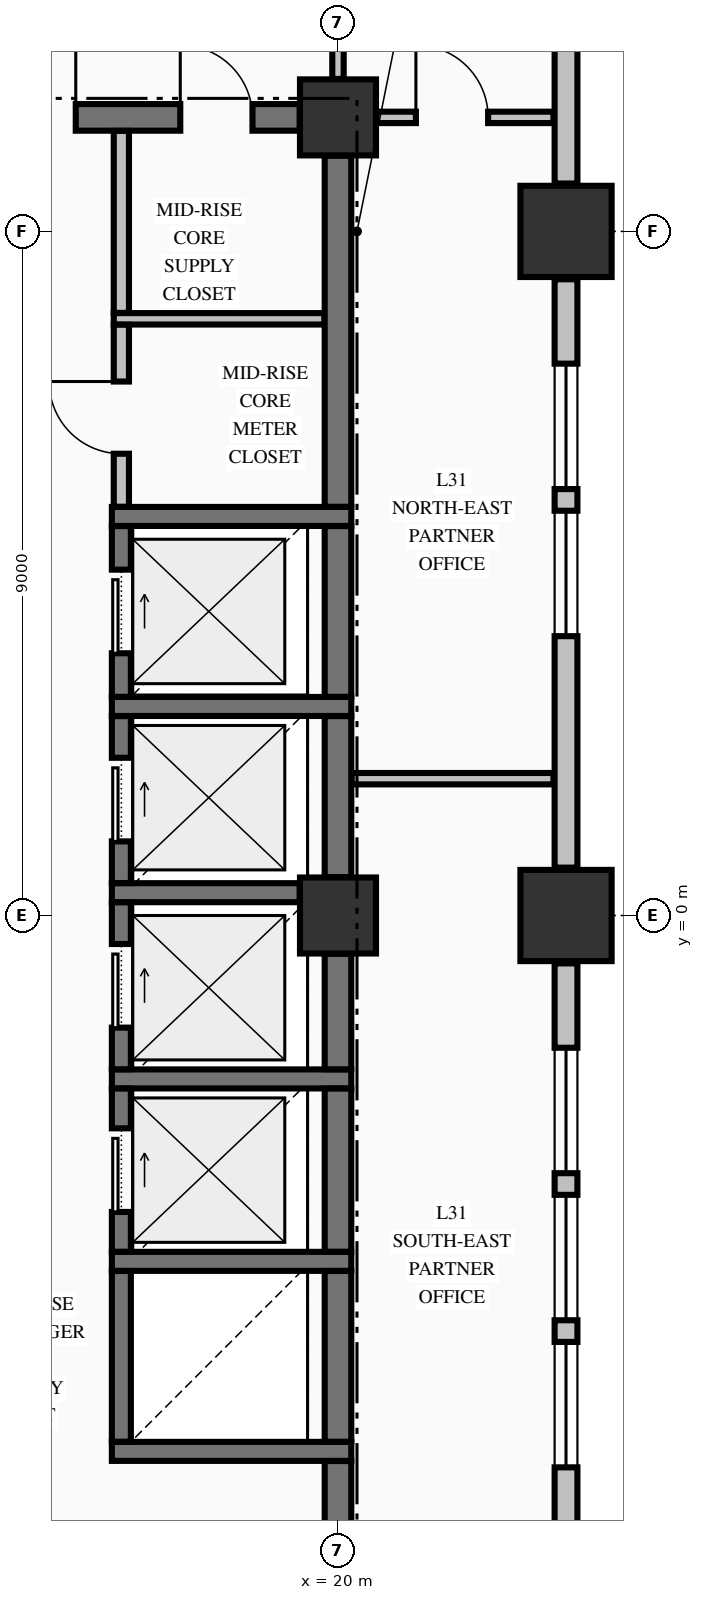
"""IFC4 building model, lengths in metres.
Left out: names, types, materials, properties, quantities, classifications, styles, units other than length and angle.
Written with IfcOpenShell. Run it as: python <this file> out.ifc"""

import sys

from ifc_helpers import new_model, si_unit, direction, frame, frame_2d, origin, origin_2d, place, context, subcontext, project, spatial, rectangle, extrude, element, fill, save


model = new_model("IFC4")
c1 = context("Model", 3, precision=1e-05, world=origin(), true_north=direction((0.0, 1.0)))
c2 = subcontext(c1, "Body", "Model", "MODEL_VIEW")
j1 = project(units=[si_unit("LENGTHUNIT", "METRE"), si_unit("PLANEANGLEUNIT", "RADIAN")], contexts=[c1])
p1 = place(None, origin())
s1 = spatial("IfcSite", under=j1, at=p1, CompositionType="ELEMENT")
p2 = place(p1, origin())
s2 = spatial("IfcBuilding", under=s1, at=p2, CompositionType="ELEMENT")
p3 = place(p2, frame((0.0, 0.0, 124.92)))
s3 = spatial("IfcBuildingStorey", under=s2, at=p3, CompositionType="ELEMENT", Elevation=124.92)
for number, where, z_axis, x_axis in (
    (1, (23.0, 0.0, -0.25), (0.0, 0.0, 1.0), (1.0, 0.0, 0.0)),
    (2, (23.0, 9.0, -0.25), (0.0, 0.0, 1.0), (1.0, 0.0, 0.0)),
):
    element("IfcColumn", number, at=place(p3, frame(where, z_axis=z_axis, x_axis=x_axis)), inside=s3, PredefinedType="COLUMN", context=c2, shape_type="SweptSolid", body=[
        extrude(rectangle(XDim=1.2, YDim=1.2, at=origin_2d()), origin(), (0.0, 0.0, 1.0), 3.57),
    ])
for number, where, z_axis, x_axis in (
    (3, (20.0, 10.5, -0.25), (0.0, 0.0, 1.0), (1.0, 0.0, 0.0)),
    (4, (20.0, 0.0, -0.25), (0.0, 0.0, 1.0), (1.0, 0.0, 0.0)),
):
    element("IfcColumn", number, at=place(p3, frame(where, z_axis=z_axis, x_axis=x_axis)), inside=s3, PredefinedType="COLUMN", context=c2, shape_type="SweptSolid", body=[
        extrude(rectangle(XDim=1.0, YDim=1.0, at=origin_2d()), origin(), (0.0, 0.0, 1.0), 3.57),
    ])
p4 = place(p3, frame((23.0, -8.37, 0.0), z_axis=(0.0, 0.0, 1.0), x_axis=(0.0, 1.0, 0.0)))
e5 = element("IfcWall", 5, at=p4, inside=s3, PredefinedType="STANDARD", context=c2, shape_type="SweptSolid", body=[
    extrude(rectangle(XDim=7.74, YDim=0.3, at=frame_2d((3.87, 0.0))), origin(), (0.0, 0.0, 1.0), 2.712),
])
p5 = place(p4, frame((1.11, 0.0, 0.8)))
e6 = element("IfcOpeningElement", 6, at=p5, cuts=e5, PredefinedType="OPENING", context=c2, shape_type="SweptSolid", body=[
    extrude(rectangle(XDim=1.65, YDim=1.7, at=frame_2d((0.825, 0.85))), frame((0.0, 0.16, 0.0), z_axis=(0.0, -1.0, 0.0), x_axis=(1.0, 0.0, 0.0)), (0.0, 0.0, 1.0), 0.32),
])
p6 = place(p4, frame((3.045, 0.0, 0.8)))
e7 = element("IfcOpeningElement", 7, at=p6, cuts=e5, PredefinedType="OPENING", context=c2, shape_type="SweptSolid", body=[
    extrude(rectangle(XDim=1.65, YDim=1.7, at=frame_2d((0.825, 0.85))), frame((0.0, 0.16, 0.0), z_axis=(0.0, -1.0, 0.0), x_axis=(1.0, 0.0, 0.0)), (0.0, 0.0, 1.0), 0.32),
])
p7 = place(p4, frame((4.98, 0.0, 0.8)))
e8 = element("IfcOpeningElement", 8, at=p7, cuts=e5, PredefinedType="OPENING", context=c2, shape_type="SweptSolid", body=[
    extrude(rectangle(XDim=1.65, YDim=1.7, at=frame_2d((0.825, 0.85))), frame((0.0, 0.16, 0.0), z_axis=(0.0, -1.0, 0.0), x_axis=(1.0, 0.0, 0.0)), (0.0, 0.0, 1.0), 0.32),
])
p8 = place(p3, frame((23.0, 0.63, 0.0), z_axis=(0.0, 0.0, 1.0), x_axis=(0.0, 1.0, 0.0)))
e9 = element("IfcWall", 9, at=p8, inside=s3, PredefinedType="STANDARD", context=c2, shape_type="SweptSolid", body=[
    extrude(rectangle(XDim=7.74, YDim=0.3, at=frame_2d((3.87, 0.0))), origin(), (0.0, 0.0, 1.0), 2.712),
])
p9 = place(p8, frame((3.045, 0.0, 0.8)))
e10 = element("IfcOpeningElement", 10, at=p9, cuts=e9, PredefinedType="OPENING", context=c2, shape_type="SweptSolid", body=[
    extrude(rectangle(XDim=1.65, YDim=1.7, at=frame_2d((0.825, 0.85))), frame((0.0, 0.16, 0.0), z_axis=(0.0, -1.0, 0.0), x_axis=(1.0, 0.0, 0.0)), (0.0, 0.0, 1.0), 0.32),
])
p10 = place(p8, frame((4.98, 0.0, 0.8)))
e11 = element("IfcOpeningElement", 11, at=p10, cuts=e9, PredefinedType="OPENING", context=c2, shape_type="SweptSolid", body=[
    extrude(rectangle(XDim=1.65, YDim=1.7, at=frame_2d((0.825, 0.85))), frame((0.0, 0.16, 0.0), z_axis=(0.0, -1.0, 0.0), x_axis=(1.0, 0.0, 0.0)), (0.0, 0.0, 1.0), 0.32),
])
p11 = place(p3, frame((23.0, 9.63, 0.0), z_axis=(0.0, 0.0, 1.0), x_axis=(0.0, 1.0, 0.0)))
e12 = element("IfcWall", 12, at=p11, inside=s3, PredefinedType="STANDARD", context=c2, shape_type="SweptSolid", body=[
    extrude(rectangle(XDim=10.74, YDim=0.3, at=frame_2d((5.37, 0.0))), origin(), (0.0, 0.0, 1.0), 2.712),
])
for number, where, z_axis, x_axis in (
    (13, (17.025, -7.05, 0.0), (0.0, 0.0, 1.0), (1.0, 0.0, 0.0)),
    (14, (17.025, -4.55, 0.0), (0.0, 0.0, 1.0), (1.0, 0.0, 0.0)),
    (15, (17.025, -2.15, 0.0), (0.0, 0.0, 1.0), (1.0, 0.0, 0.0)),
):
    element("IfcWall", number, at=place(p3, frame(where, z_axis=z_axis, x_axis=x_axis)), inside=s3, PredefinedType="SOLIDWALL", context=c2, shape_type="SweptSolid", body=[
        extrude(rectangle(XDim=3.15, YDim=0.25, at=frame_2d((1.575, 0.0))), origin(), (0.0, 0.0, 1.0), 3.32),
    ])
p12 = place(p3, frame((17.025, 0.3, 0.0), z_axis=(0.0, 0.0, 1.0), x_axis=(1.0, 0.0, 0.0)))
e16 = element("IfcWall", 16, at=p12, inside=s3, PredefinedType="SOLIDWALL", context=c2, shape_type="SweptSolid", body=[
    extrude(rectangle(XDim=2.471, YDim=0.25, at=frame_2d((1.236, 0.0))), origin(), (0.0, 0.0, 1.0), 3.32),
])
for number, where, z_axis, x_axis in (
    (17, (17.025, 2.75, 0.0), (0.0, 0.0, 1.0), (1.0, 0.0, 0.0)),
    (18, (17.025, 5.25, 0.0), (0.0, 0.0, 1.0), (1.0, 0.0, 0.0)),
):
    element("IfcWall", number, at=place(p3, frame(where, z_axis=z_axis, x_axis=x_axis)), inside=s3, PredefinedType="SOLIDWALL", context=c2, shape_type="SweptSolid", body=[
        extrude(rectangle(XDim=3.15, YDim=0.25, at=frame_2d((1.575, 0.0))), origin(), (0.0, 0.0, 1.0), 3.32),
    ])
p13 = place(p3, frame((14.7, 10.5, 0.0), z_axis=(0.0, 0.0, 1.0), x_axis=(1.0, 0.0, 0.0)))
e19 = element("IfcWall", 19, at=p13, inside=s3, PredefinedType="SHEAR", context=c2, shape_type="SweptSolid", body=[
    extrude(rectangle(XDim=4.796, YDim=0.35, at=frame_2d((2.398, 0.0))), origin(), (0.0, 0.0, 1.0), 3.32),
])
p14 = place(p13, frame((0.65, 0.0, 0.0)))
e20 = element("IfcOpeningElement", 20, at=p14, cuts=e19, PredefinedType="OPENING", context=c2, shape_type="SweptSolid", body=[
    extrude(rectangle(XDim=1.2, YDim=2.15, at=frame_2d((0.6, 1.075))), frame((0.0, 0.185, 0.0), z_axis=(0.0, -1.0, 0.0), x_axis=(1.0, 0.0, 0.0)), (0.0, 0.0, 1.0), 0.37),
])
p15 = place(p13, frame((3.225, 0.0, 0.0)))
e21 = element("IfcOpeningElement", 21, at=p15, cuts=e19, PredefinedType="OPENING", context=c2, shape_type="SweptSolid", body=[
    extrude(rectangle(XDim=0.95, YDim=2.15, at=frame_2d((0.475, 1.075))), frame((0.0, 0.185, 0.0), z_axis=(0.0, -1.0, 0.0), x_axis=(1.0, 0.0, 0.0)), (0.0, 0.0, 1.0), 0.37),
])
p16 = place(p3, frame((20.178, 1.8, 0.0), z_axis=(0.0, 0.0, 1.0), x_axis=(1.0, 0.0, 0.0)))
e22 = element("IfcWall", 22, at=p16, inside=s3, PredefinedType="PARTITIONING", context=c2, shape_type="SweptSolid", body=[
    extrude(rectangle(XDim=2.657, YDim=0.15, at=frame_2d((1.329, 0.0))), origin(), (0.0, 0.0, 1.0), 3.32),
])
p17 = place(p3, frame((17.05, 7.85, 0.0), z_axis=(0.0, 0.0, 1.0), x_axis=(1.0, 0.0, 0.0)))
e23 = element("IfcWall", 23, at=p17, inside=s3, PredefinedType="PARTITIONING", context=c2, shape_type="SweptSolid", body=[
    extrude(rectangle(XDim=2.772, YDim=0.15, at=frame_2d((1.386, 0.0))), origin(), (0.0, 0.0, 1.0), 3.32),
])
p18 = place(p3, frame((20.506, 10.5, 0.0), z_axis=(0.0, 0.0, 1.0), x_axis=(1.0, 0.0, 0.0)))
e24 = element("IfcWall", 24, at=p18, inside=s3, PredefinedType="PARTITIONING", context=c2, shape_type="SweptSolid", body=[
    extrude(rectangle(XDim=2.329, YDim=0.15, at=frame_2d((1.165, 0.0))), origin(), (0.0, 0.0, 1.0), 3.32),
])
p19 = place(p18, frame((0.519, 0.0, 0.0)))
e25 = element("IfcOpeningElement", 25, at=p19, cuts=e24, PredefinedType="OPENING", context=c2, shape_type="SweptSolid", body=[
    extrude(rectangle(XDim=0.95, YDim=2.15, at=frame_2d((0.475, 1.075))), frame((0.0, 0.085, 0.0), z_axis=(0.0, -1.0, 0.0), x_axis=(1.0, 0.0, 0.0)), (0.0, 0.0, 1.0), 0.17),
])
p20 = place(p3, frame((17.15, -6.923, 0.0), z_axis=(0.0, 0.0, 1.0), x_axis=(0.0, 1.0, 0.0)))
e26 = element("IfcWall", 26, at=p20, inside=s3, PredefinedType="SOLIDWALL", context=c2, shape_type="SweptSolid", body=[
    extrude(rectangle(XDim=2.246, YDim=0.25, at=frame_2d((1.123, 0.0))), origin(), (0.0, 0.0, 1.0), 3.32),
])
p21 = place(p3, frame((17.15, -4.423, 0.0), z_axis=(0.0, 0.0, 1.0), x_axis=(0.0, 1.0, 0.0)))
e27 = element("IfcWall", 27, at=p21, inside=s3, PredefinedType="SOLIDWALL", context=c2, shape_type="SweptSolid", body=[
    extrude(rectangle(XDim=2.146, YDim=0.25, at=frame_2d((1.073, 0.0))), origin(), (0.0, 0.0, 1.0), 3.32),
])
p22 = place(p21, frame((0.523, 0.0, 0.0)))
e28 = element("IfcOpeningElement", 28, at=p22, cuts=e27, PredefinedType="OPENING", context=c2, shape_type="SweptSolid", body=[
    extrude(rectangle(XDim=1.1, YDim=2.2, at=frame_2d((0.55, 1.1))), frame((0.0, 0.135, 0.0), z_axis=(0.0, -1.0, 0.0), x_axis=(1.0, 0.0, 0.0)), (0.0, 0.0, 1.0), 0.27),
])
p23 = place(p3, frame((17.15, -2.023, 0.0), z_axis=(0.0, 0.0, 1.0), x_axis=(0.0, 1.0, 0.0)))
e29 = element("IfcWall", 29, at=p23, inside=s3, PredefinedType="SOLIDWALL", context=c2, shape_type="SweptSolid", body=[
    extrude(rectangle(XDim=2.196, YDim=0.25, at=frame_2d((1.098, 0.0))), origin(), (0.0, 0.0, 1.0), 3.32),
])
p24 = place(p23, frame((0.548, 0.0, 0.0)))
e30 = element("IfcOpeningElement", 30, at=p24, cuts=e29, PredefinedType="OPENING", context=c2, shape_type="SweptSolid", body=[
    extrude(rectangle(XDim=1.1, YDim=2.2, at=frame_2d((0.55, 1.1))), frame((0.0, 0.135, 0.0), z_axis=(0.0, -1.0, 0.0), x_axis=(1.0, 0.0, 0.0)), (0.0, 0.0, 1.0), 0.27),
])
p25 = place(p3, frame((17.15, 0.427, 0.0), z_axis=(0.0, 0.0, 1.0), x_axis=(0.0, 1.0, 0.0)))
e31 = element("IfcWall", 31, at=p25, inside=s3, PredefinedType="SOLIDWALL", context=c2, shape_type="SweptSolid", body=[
    extrude(rectangle(XDim=2.196, YDim=0.25, at=frame_2d((1.098, 0.0))), origin(), (0.0, 0.0, 1.0), 3.32),
])
p26 = place(p25, frame((0.548, 0.0, 0.0)))
e32 = element("IfcOpeningElement", 32, at=p26, cuts=e31, PredefinedType="OPENING", context=c2, shape_type="SweptSolid", body=[
    extrude(rectangle(XDim=1.1, YDim=2.2, at=frame_2d((0.55, 1.1))), frame((0.0, 0.135, 0.0), z_axis=(0.0, -1.0, 0.0), x_axis=(1.0, 0.0, 0.0)), (0.0, 0.0, 1.0), 0.27),
])
p27 = place(p3, frame((17.15, 2.877, 0.0), z_axis=(0.0, 0.0, 1.0), x_axis=(0.0, 1.0, 0.0)))
e33 = element("IfcWall", 33, at=p27, inside=s3, PredefinedType="SOLIDWALL", context=c2, shape_type="SweptSolid", body=[
    extrude(rectangle(XDim=2.246, YDim=0.25, at=frame_2d((1.123, 0.0))), origin(), (0.0, 0.0, 1.0), 3.32),
])
p28 = place(p27, frame((0.573, 0.0, 0.0)))
e34 = element("IfcOpeningElement", 34, at=p28, cuts=e33, PredefinedType="OPENING", context=c2, shape_type="SweptSolid", body=[
    extrude(rectangle(XDim=1.1, YDim=2.2, at=frame_2d((0.55, 1.1))), frame((0.0, 0.135, 0.0), z_axis=(0.0, -1.0, 0.0), x_axis=(1.0, 0.0, 0.0)), (0.0, 0.0, 1.0), 0.27),
])
p29 = place(p3, frame((20.0, -9.446, 0.0), z_axis=(0.0, 0.0, 1.0), x_axis=(0.0, 1.0, 0.0)))
e35 = element("IfcWall", 35, at=p29, inside=s3, PredefinedType="SHEAR", context=c2, shape_type="SweptSolid", body=[
    extrude(rectangle(XDim=2.269, YDim=0.35, at=frame_2d((1.135, 0.0))), origin(), (0.0, 0.0, 1.0), 3.32),
])
p30 = place(p3, frame((20.0, -6.923, 0.0), z_axis=(0.0, 0.0, 1.0), x_axis=(0.0, 1.0, 0.0)))
e36 = element("IfcWall", 36, at=p30, inside=s3, PredefinedType="SHEAR", context=c2, shape_type="SweptSolid", body=[
    extrude(rectangle(XDim=2.246, YDim=0.35, at=frame_2d((1.123, 0.0))), origin(), (0.0, 0.0, 1.0), 3.32),
])
p31 = place(p3, frame((20.0, -4.423, 0.0), z_axis=(0.0, 0.0, 1.0), x_axis=(0.0, 1.0, 0.0)))
e37 = element("IfcWall", 37, at=p31, inside=s3, PredefinedType="SHEAR", context=c2, shape_type="SweptSolid", body=[
    extrude(rectangle(XDim=2.146, YDim=0.35, at=frame_2d((1.073, 0.0))), origin(), (0.0, 0.0, 1.0), 3.32),
])
p32 = place(p3, frame((20.0, -2.023, 0.0), z_axis=(0.0, 0.0, 1.0), x_axis=(0.0, 1.0, 0.0)))
e38 = element("IfcWall", 38, at=p32, inside=s3, PredefinedType="SHEAR", context=c2, shape_type="SweptSolid", body=[
    extrude(rectangle(XDim=1.519, YDim=0.35, at=frame_2d((0.76, 0.0))), origin(), (0.0, 0.0, 1.0), 3.32),
])
p33 = place(p3, frame((20.0, 0.504, 0.0), z_axis=(0.0, 0.0, 1.0), x_axis=(0.0, 1.0, 0.0)))
e39 = element("IfcWall", 39, at=p33, inside=s3, PredefinedType="SHEAR", context=c2, shape_type="SweptSolid", body=[
    extrude(rectangle(XDim=2.119, YDim=0.35, at=frame_2d((1.06, 0.0))), origin(), (0.0, 0.0, 1.0), 3.32),
])
p34 = place(p3, frame((20.0, 2.877, 0.0), z_axis=(0.0, 0.0, 1.0), x_axis=(0.0, 1.0, 0.0)))
e40 = element("IfcWall", 40, at=p34, inside=s3, PredefinedType="SHEAR", context=c2, shape_type="SweptSolid", body=[
    extrude(rectangle(XDim=2.246, YDim=0.35, at=frame_2d((1.123, 0.0))), origin(), (0.0, 0.0, 1.0), 3.32),
])
p35 = place(p3, frame((20.0, 5.377, 0.0), z_axis=(0.0, 0.0, 1.0), x_axis=(0.0, 1.0, 0.0)))
e41 = element("IfcWall", 41, at=p35, inside=s3, PredefinedType="SHEAR", context=c2, shape_type="SweptSolid", body=[
    extrude(rectangle(XDim=4.619, YDim=0.35, at=frame_2d((2.31, 0.0))), origin(), (0.0, 0.0, 1.0), 3.32),
])
p36 = place(p3, frame((17.15, 5.378, 0.0), z_axis=(0.0, 0.0, 1.0), x_axis=(0.0, 1.0, 0.0)))
e42 = element("IfcWall", 42, at=p36, inside=s3, PredefinedType="PARTITIONING", context=c2, shape_type="SweptSolid", body=[
    extrude(rectangle(XDim=2.394, YDim=0.2, at=frame_2d((1.197, 0.0))), origin(), (0.0, 0.0, 1.0), 3.32),
])
p37 = place(p36, frame((0.697, 0.0, 0.0)))
e43 = element("IfcOpeningElement", 43, at=p37, cuts=e42, PredefinedType="OPENING", context=c2, shape_type="SweptSolid", body=[
    extrude(rectangle(XDim=0.95, YDim=2.15, at=frame_2d((0.475, 1.075))), frame((0.0, 0.11, 0.0), z_axis=(0.0, -1.0, 0.0), x_axis=(1.0, 0.0, 0.0)), (0.0, 0.0, 1.0), 0.22),
])
p38 = place(p3, frame((17.15, 7.928, 0.0), z_axis=(0.0, 0.0, 1.0), x_axis=(0.0, 1.0, 0.0)))
e44 = element("IfcWall", 44, at=p38, inside=s3, PredefinedType="PARTITIONING", context=c2, shape_type="SweptSolid", body=[
    extrude(rectangle(XDim=2.394, YDim=0.2, at=frame_2d((1.197, 0.0))), origin(), (0.0, 0.0, 1.0), 3.32),
])
p39 = place(p3, frame((20.0, 11.006, 0.0), z_axis=(0.0, 0.0, 1.0), x_axis=(0.0, 1.0, 0.0)))
e45 = element("IfcWall", 45, at=p39, inside=s3, PredefinedType="PARTITIONING", context=c2, shape_type="SweptSolid", body=[
    extrude(rectangle(XDim=2.716, YDim=0.15, at=frame_2d((1.358, 0.0))), origin(), (0.0, 0.0, 1.0), 2.81),
])
p40 = place(p39, frame((0.669, 0.0, 0.0)))
e46 = element("IfcOpeningElement", 46, at=p40, cuts=e45, PredefinedType="OPENING", context=c2, shape_type="SweptSolid", body=[
    extrude(rectangle(XDim=0.95, YDim=2.15, at=frame_2d((0.475, 1.075))), frame((0.0, 0.085, 0.0), z_axis=(0.0, -1.0, 0.0), x_axis=(1.0, 0.0, 0.0)), (0.0, 0.0, 1.0), 0.17),
])
p41 = place(p5, origin())
e47 = element("IfcWindow", 47, at=p41, inside=s3, PartitioningType="SINGLE_PANEL", PredefinedType="WINDOW", context=c2, shape_type="SweptSolid", body=[
    extrude(rectangle(XDim=1.65, YDim=1.7, at=frame_2d((0.825, 0.85))), frame((0.0, 0.03, 0.0), z_axis=(0.0, -1.0, 0.0), x_axis=(1.0, 0.0, 0.0)), (0.0, 0.0, 1.0), 0.06),
])
fill(e6, e47)
p42 = place(p6, origin())
e48 = element("IfcWindow", 48, at=p42, inside=s3, PartitioningType="SINGLE_PANEL", PredefinedType="WINDOW", context=c2, shape_type="SweptSolid", body=[
    extrude(rectangle(XDim=1.65, YDim=1.7, at=frame_2d((0.825, 0.85))), frame((0.0, 0.03, 0.0), z_axis=(0.0, -1.0, 0.0), x_axis=(1.0, 0.0, 0.0)), (0.0, 0.0, 1.0), 0.06),
])
fill(e7, e48)
p43 = place(p7, origin())
e49 = element("IfcWindow", 49, at=p43, inside=s3, PartitioningType="SINGLE_PANEL", PredefinedType="WINDOW", context=c2, shape_type="SweptSolid", body=[
    extrude(rectangle(XDim=1.65, YDim=1.7, at=frame_2d((0.825, 0.85))), frame((0.0, 0.03, 0.0), z_axis=(0.0, -1.0, 0.0), x_axis=(1.0, 0.0, 0.0)), (0.0, 0.0, 1.0), 0.06),
])
fill(e8, e49)
p44 = place(p9, origin())
e50 = element("IfcWindow", 50, at=p44, inside=s3, PartitioningType="SINGLE_PANEL", PredefinedType="WINDOW", context=c2, shape_type="SweptSolid", body=[
    extrude(rectangle(XDim=1.65, YDim=1.7, at=frame_2d((0.825, 0.85))), frame((0.0, 0.03, 0.0), z_axis=(0.0, -1.0, 0.0), x_axis=(1.0, 0.0, 0.0)), (0.0, 0.0, 1.0), 0.06),
])
fill(e10, e50)
p45 = place(p10, origin())
e51 = element("IfcWindow", 51, at=p45, inside=s3, PartitioningType="SINGLE_PANEL", PredefinedType="WINDOW", context=c2, shape_type="SweptSolid", body=[
    extrude(rectangle(XDim=1.65, YDim=1.7, at=frame_2d((0.825, 0.85))), frame((0.0, 0.03, 0.0), z_axis=(0.0, -1.0, 0.0), x_axis=(1.0, 0.0, 0.0)), (0.0, 0.0, 1.0), 0.06),
])
fill(e11, e51)
p46 = place(p22, origin())
e52 = element("IfcDoor", 52, at=p46, inside=s3, OperationType="SLIDING_TO_RIGHT", PredefinedType="DOOR", context=c2, shape_type="SweptSolid", body=[
    extrude(rectangle(XDim=1.1, YDim=2.2, at=frame_2d((0.55, 1.1))), frame((0.0, 0.025, 0.0), z_axis=(0.0, -1.0, 0.0), x_axis=(1.0, 0.0, 0.0)), (0.0, 0.0, 1.0), 0.05),
])
fill(e28, e52)
p47 = place(p24, origin())
e53 = element("IfcDoor", 53, at=p47, inside=s3, OperationType="SLIDING_TO_RIGHT", PredefinedType="DOOR", context=c2, shape_type="SweptSolid", body=[
    extrude(rectangle(XDim=1.1, YDim=2.2, at=frame_2d((0.55, 1.1))), frame((0.0, 0.025, 0.0), z_axis=(0.0, -1.0, 0.0), x_axis=(1.0, 0.0, 0.0)), (0.0, 0.0, 1.0), 0.05),
])
fill(e30, e53)
p48 = place(p26, origin())
e54 = element("IfcDoor", 54, at=p48, inside=s3, OperationType="SLIDING_TO_RIGHT", PredefinedType="DOOR", context=c2, shape_type="SweptSolid", body=[
    extrude(rectangle(XDim=1.1, YDim=2.2, at=frame_2d((0.55, 1.1))), frame((0.0, 0.025, 0.0), z_axis=(0.0, -1.0, 0.0), x_axis=(1.0, 0.0, 0.0)), (0.0, 0.0, 1.0), 0.05),
])
fill(e32, e54)
p49 = place(p28, origin())
e55 = element("IfcDoor", 55, at=p49, inside=s3, OperationType="SLIDING_TO_RIGHT", PredefinedType="DOOR", context=c2, shape_type="SweptSolid", body=[
    extrude(rectangle(XDim=1.1, YDim=2.2, at=frame_2d((0.55, 1.1))), frame((0.0, 0.025, 0.0), z_axis=(0.0, -1.0, 0.0), x_axis=(1.0, 0.0, 0.0)), (0.0, 0.0, 1.0), 0.05),
])
fill(e34, e55)
p50 = place(p14, origin())
e56 = element("IfcDoor", 56, at=p50, inside=s3, OperationType="SINGLE_SWING_RIGHT", PredefinedType="DOOR", context=c2, shape_type="SweptSolid", body=[
    extrude(rectangle(XDim=1.2, YDim=2.15, at=frame_2d((0.6, 1.075))), frame((0.0, 0.025, 0.0), z_axis=(0.0, -1.0, 0.0), x_axis=(1.0, 0.0, 0.0)), (0.0, 0.0, 1.0), 0.05),
])
fill(e20, e56)
p51 = place(p15, origin())
e57 = element("IfcDoor", 57, at=p51, inside=s3, OperationType="SINGLE_SWING_LEFT", PredefinedType="DOOR", context=c2, shape_type="SweptSolid", body=[
    extrude(rectangle(XDim=0.95, YDim=2.15, at=frame_2d((0.475, 1.075))), frame((0.0, 0.025, 0.0), z_axis=(0.0, -1.0, 0.0), x_axis=(1.0, 0.0, 0.0)), (0.0, 0.0, 1.0), 0.05),
])
fill(e21, e57)
p52 = place(p37, origin())
e58 = element("IfcDoor", 58, at=p52, inside=s3, OperationType="SINGLE_SWING_RIGHT", PredefinedType="DOOR", context=c2, shape_type="SweptSolid", body=[
    extrude(rectangle(XDim=0.95, YDim=2.15, at=frame_2d((0.475, 1.075))), frame((0.0, 0.025, 0.0), z_axis=(0.0, -1.0, 0.0), x_axis=(1.0, 0.0, 0.0)), (0.0, 0.0, 1.0), 0.05),
])
fill(e43, e58)
p53 = place(p19, origin())
e59 = element("IfcDoor", 59, at=p53, inside=s3, OperationType="SINGLE_SWING_LEFT", PredefinedType="DOOR", context=c2, shape_type="SweptSolid", body=[
    extrude(rectangle(XDim=0.95, YDim=2.15, at=frame_2d((0.475, 1.075))), frame((0.0, 0.025, 0.0), z_axis=(0.0, -1.0, 0.0), x_axis=(1.0, 0.0, 0.0)), (0.0, 0.0, 1.0), 0.05),
])
fill(e25, e59)
save(model, sys.argv[1])
